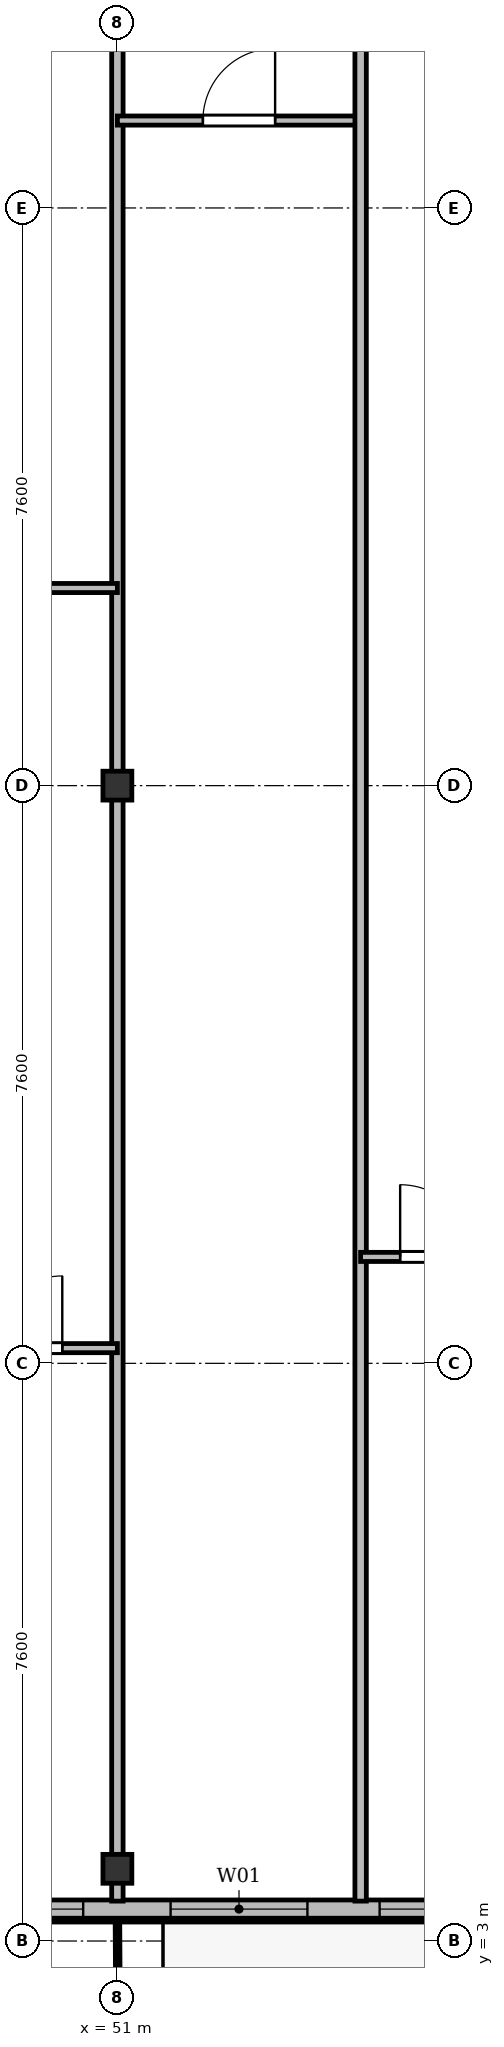
"""IFC4 building model, lengths in metres.
Left out: names, types, materials, properties, quantities, classifications, styles, units other than length and angle.
Written with IfcOpenShell. Run it as: python <this file> out.ifc"""

import sys

from ifc_helpers import new_model, si_unit, direction, frame, frame_2d, origin, origin_2d, place, context, subcontext, project, spatial, rectangle, i_section, extrude, source, transform, mapped, element, fill, save


model = new_model("IFC4")
c1 = context("Model", 3, precision=1e-05, world=origin(), true_north=direction((0.0, 1.0)))
c2 = subcontext(c1, "Body", "Model", "MODEL_VIEW")
j1 = project(units=[si_unit("LENGTHUNIT", "METRE"), si_unit("PLANEANGLEUNIT", "RADIAN")], contexts=[c1])
p1 = place(None, origin())
s1 = spatial("IfcSite", under=j1, at=p1, CompositionType="ELEMENT")
p2 = place(p1, origin())
s2 = spatial("IfcBuilding", under=s1, at=p2, CompositionType="ELEMENT")
p3 = place(p2, frame((0.0, 0.0, 139.3)))
s3 = spatial("IfcBuildingStorey", under=s2, at=p3, CompositionType="ELEMENT", Elevation=139.3)
m1 = source(origin(), c2, "Body", "SweptSolid", [
    extrude(i_section(OverallWidth=0.38, OverallDepth=0.38, WebThickness=0.02, FlangeThickness=0.03, at=origin_2d()), origin(), (0.0, 0.0, 1.0), 3.6),
])
for number, where, z_axis, x_axis in (
    (1, (51.0, 3.95, 0.0), (0.0, 0.0, 1.0), (1.0, 0.0, 0.0)),
    (2, (51.0, 18.2, 0.0), (0.0, 0.0, 1.0), (1.0, 0.0, 0.0)),
):
    element("IfcColumn", number, at=place(p3, frame(where, z_axis=z_axis, x_axis=x_axis)), inside=s3, PredefinedType="COLUMN", context=c2, shape_type="MappedRepresentation", body=[
        mapped(m1, transform((0.0, 0.0, 0.0), x_axis=(1.0, 0.0, 0.0), y_axis=(0.0, 1.0, 0.0), z_axis=(0.0, 0.0, 1.0), scale=1.0)),
    ])
p4 = place(p3, frame((63.6, 3.42, 0.0), z_axis=(0.0, 0.0, 1.0), x_axis=(-1.0, 0.0, 0.0)))
e3 = element("IfcWall", 3, at=p4, inside=s3, PredefinedType="SOLIDWALL", context=c2, shape_type="SweptSolid", body=[
    extrude(rectangle(XDim=52.8, YDim=0.24, at=frame_2d((26.4, 0.0))), origin(), (0.0, 0.0, 1.0), 3.35),
])
p5 = place(p4, frame((0.495, 0.0, 0.9)))
e4 = element("IfcOpeningElement", 4, at=p5, cuts=e3, PredefinedType="OPENING", context=c2, shape_type="SweptSolid", body=[
    extrude(rectangle(XDim=1.5, YDim=1.75, at=frame_2d((0.75, 0.875))), frame((0.0, 0.13, 0.0), z_axis=(0.0, -1.0, 0.0), x_axis=(1.0, 0.0, 0.0)), (0.0, 0.0, 1.0), 0.26),
])
p6 = place(p4, frame((2.9, 0.0, 0.9)))
e5 = element("IfcOpeningElement", 5, at=p6, cuts=e3, PredefinedType="OPENING", context=c2, shape_type="SweptSolid", body=[
    extrude(rectangle(XDim=1.5, YDim=1.75, at=frame_2d((0.75, 0.875))), frame((0.0, 0.13, 0.0), z_axis=(0.0, -1.0, 0.0), x_axis=(1.0, 0.0, 0.0)), (0.0, 0.0, 1.0), 0.26),
])
p7 = place(p4, frame((5.902, 0.0, 0.0)))
e6 = element("IfcOpeningElement", 6, at=p7, cuts=e3, PredefinedType="OPENING", context=c2, shape_type="SweptSolid", body=[
    extrude(rectangle(XDim=1.2, YDim=2.2, at=frame_2d((0.6, 1.1))), frame((0.0, 0.13, 0.0), z_axis=(0.0, -1.0, 0.0), x_axis=(1.0, 0.0, 0.0)), (0.0, 0.0, 1.0), 0.26),
])
p8 = place(p4, frame((7.65, 0.0, 0.9)))
e7 = element("IfcOpeningElement", 7, at=p8, cuts=e3, PredefinedType="OPENING", context=c2, shape_type="SweptSolid", body=[
    extrude(rectangle(XDim=1.5, YDim=1.75, at=frame_2d((0.75, 0.875))), frame((0.0, 0.13, 0.0), z_axis=(0.0, -1.0, 0.0), x_axis=(1.0, 0.0, 0.0)), (0.0, 0.0, 1.0), 0.26),
])
p9 = place(p4, frame((10.1, 0.0, 0.9)))
e8 = element("IfcOpeningElement", 8, at=p9, cuts=e3, PredefinedType="OPENING", context=c2, shape_type="SweptSolid", body=[
    extrude(rectangle(XDim=1.8, YDim=1.8, at=frame_2d((0.9, 0.9))), frame((0.0, 0.13, 0.0), z_axis=(0.0, -1.0, 0.0), x_axis=(1.0, 0.0, 0.0)), (0.0, 0.0, 1.0), 0.26),
])
p10 = place(p4, frame((13.05, 0.0, 0.9)))
e9 = element("IfcOpeningElement", 9, at=p10, cuts=e3, PredefinedType="OPENING", context=c2, shape_type="SweptSolid", body=[
    extrude(rectangle(XDim=1.5, YDim=1.75, at=frame_2d((0.75, 0.875))), frame((0.0, 0.13, 0.0), z_axis=(0.0, -1.0, 0.0), x_axis=(1.0, 0.0, 0.0)), (0.0, 0.0, 1.0), 0.26),
])
p11 = place(p4, frame((15.45, 0.0, 0.9)))
e10 = element("IfcOpeningElement", 10, at=p11, cuts=e3, PredefinedType="OPENING", context=c2, shape_type="SweptSolid", body=[
    extrude(rectangle(XDim=1.5, YDim=1.75, at=frame_2d((0.75, 0.875))), frame((0.0, 0.13, 0.0), z_axis=(0.0, -1.0, 0.0), x_axis=(1.0, 0.0, 0.0)), (0.0, 0.0, 1.0), 0.26),
])
p12 = place(p4, frame((17.6, 0.0, 0.9)))
e11 = element("IfcOpeningElement", 11, at=p12, cuts=e3, PredefinedType="OPENING", context=c2, shape_type="SweptSolid", body=[
    extrude(rectangle(XDim=2.0, YDim=1.95, at=frame_2d((1.0, 0.975))), frame((0.0, 0.13, 0.0), z_axis=(0.0, -1.0, 0.0), x_axis=(1.0, 0.0, 0.0)), (0.0, 0.0, 1.0), 0.26),
])
p13 = place(p4, frame((20.625, 0.0, 0.9)))
e12 = element("IfcOpeningElement", 12, at=p13, cuts=e3, PredefinedType="OPENING", context=c2, shape_type="SweptSolid", body=[
    extrude(rectangle(XDim=1.65, YDim=1.85, at=frame_2d((0.825, 0.925))), frame((0.0, 0.13, 0.0), z_axis=(0.0, -1.0, 0.0), x_axis=(1.0, 0.0, 0.0)), (0.0, 0.0, 1.0), 0.26),
])
p14 = place(p4, frame((23.85, 0.0, 0.9)))
e13 = element("IfcOpeningElement", 13, at=p14, cuts=e3, PredefinedType="OPENING", context=c2, shape_type="SweptSolid", body=[
    extrude(rectangle(XDim=1.8, YDim=1.8, at=frame_2d((0.9, 0.9))), frame((0.0, 0.13, 0.0), z_axis=(0.0, -1.0, 0.0), x_axis=(1.0, 0.0, 0.0)), (0.0, 0.0, 1.0), 0.26),
])
p15 = place(p4, frame((28.6, 0.0, 0.9)))
e14 = element("IfcOpeningElement", 14, at=p15, cuts=e3, PredefinedType="OPENING", context=c2, shape_type="SweptSolid", body=[
    extrude(rectangle(XDim=2.2, YDim=1.8, at=frame_2d((1.1, 0.9))), frame((0.0, 0.13, 0.0), z_axis=(0.0, -1.0, 0.0), x_axis=(1.0, 0.0, 0.0)), (0.0, 0.0, 1.0), 0.26),
])
p16 = place(p4, frame((34.478, 0.0, 0.0)))
e15 = element("IfcOpeningElement", 15, at=p16, cuts=e3, PredefinedType="OPENING", context=c2, shape_type="SweptSolid", body=[
    extrude(rectangle(XDim=1.2, YDim=2.2, at=frame_2d((0.6, 1.1))), frame((0.0, 0.13, 0.0), z_axis=(0.0, -1.0, 0.0), x_axis=(1.0, 0.0, 0.0)), (0.0, 0.0, 1.0), 0.26),
])
p17 = place(p4, frame((37.4, 0.0, 0.9)))
e16 = element("IfcOpeningElement", 16, at=p17, cuts=e3, PredefinedType="OPENING", context=c2, shape_type="SweptSolid", body=[
    extrude(rectangle(XDim=2.0, YDim=1.95, at=frame_2d((1.0, 0.975))), frame((0.0, 0.13, 0.0), z_axis=(0.0, -1.0, 0.0), x_axis=(1.0, 0.0, 0.0)), (0.0, 0.0, 1.0), 0.26),
])
p18 = place(p4, frame((40.975, 0.0, 0.9)))
e17 = element("IfcOpeningElement", 17, at=p18, cuts=e3, PredefinedType="OPENING", context=c2, shape_type="SweptSolid", body=[
    extrude(rectangle(XDim=1.65, YDim=1.85, at=frame_2d((0.825, 0.925))), frame((0.0, 0.13, 0.0), z_axis=(0.0, -1.0, 0.0), x_axis=(1.0, 0.0, 0.0)), (0.0, 0.0, 1.0), 0.26),
])
p19 = place(p4, frame((43.65, 0.0, 0.9)))
e18 = element("IfcOpeningElement", 18, at=p19, cuts=e3, PredefinedType="OPENING", context=c2, shape_type="SweptSolid", body=[
    extrude(rectangle(XDim=1.5, YDim=1.75, at=frame_2d((0.75, 0.875))), frame((0.0, 0.13, 0.0), z_axis=(0.0, -1.0, 0.0), x_axis=(1.0, 0.0, 0.0)), (0.0, 0.0, 1.0), 0.26),
])
p20 = place(p4, frame((45.85, 0.0, 0.9)))
e19 = element("IfcOpeningElement", 19, at=p20, cuts=e3, PredefinedType="OPENING", context=c2, shape_type="SweptSolid", body=[
    extrude(rectangle(XDim=1.5, YDim=1.75, at=frame_2d((0.75, 0.875))), frame((0.0, 0.13, 0.0), z_axis=(0.0, -1.0, 0.0), x_axis=(1.0, 0.0, 0.0)), (0.0, 0.0, 1.0), 0.26),
])
p21 = place(p4, frame((48.25, 0.0, 0.9)))
e20 = element("IfcOpeningElement", 20, at=p21, cuts=e3, PredefinedType="OPENING", context=c2, shape_type="SweptSolid", body=[
    extrude(rectangle(XDim=1.5, YDim=1.75, at=frame_2d((0.75, 0.875))), frame((0.0, 0.13, 0.0), z_axis=(0.0, -1.0, 0.0), x_axis=(1.0, 0.0, 0.0)), (0.0, 0.0, 1.0), 0.26),
])
p22 = place(p4, frame((50.455, 0.0, 0.9)))
e21 = element("IfcOpeningElement", 21, at=p22, cuts=e3, PredefinedType="OPENING", context=c2, shape_type="SweptSolid", body=[
    extrude(rectangle(XDim=2.0, YDim=1.95, at=frame_2d((1.0, 0.975))), frame((0.0, 0.13, 0.0), z_axis=(0.0, -1.0, 0.0), x_axis=(1.0, 0.0, 0.0)), (0.0, 0.0, 1.0), 0.26),
])
p23 = place(p3, frame((51.0, 3.525, 0.0), z_axis=(0.0, 0.0, 1.0), x_axis=(0.0, 1.0, 0.0)))
e22 = element("IfcWall", 22, at=p23, inside=s3, PredefinedType="PARTITIONING", context=c2, shape_type="SweptSolid", body=[
    extrude(rectangle(XDim=27.275, YDim=0.15, at=frame_2d((13.638, 0.0))), origin(), (0.0, 0.0, 1.0), 2.85),
])
p24 = place(p3, frame((43.8, 20.8, 0.0), z_axis=(0.0, 0.0, 1.0), x_axis=(1.0, 0.0, 0.0)))
e23 = element("IfcWall", 23, at=p24, inside=s3, PredefinedType="PARTITIONING", context=c2, shape_type="SweptSolid", body=[
    extrude(rectangle(XDim=7.2, YDim=0.12, at=frame_2d((3.6, 0.0))), origin(), (0.0, 0.0, 1.0), 2.85),
])
p25 = place(p24, frame((3.125, 0.0, 0.0)))
e24 = element("IfcOpeningElement", 24, at=p25, cuts=e23, PredefinedType="OPENING", context=c2, shape_type="SweptSolid", body=[
    extrude(rectangle(XDim=0.95, YDim=2.15, at=frame_2d((0.475, 1.075))), frame((0.0, 0.07, 0.0), z_axis=(0.0, -1.0, 0.0), x_axis=(1.0, 0.0, 0.0)), (0.0, 0.0, 1.0), 0.14),
])
p26 = place(p3, frame((48.6, 10.8, 0.0), z_axis=(0.0, 0.0, 1.0), x_axis=(1.0, 0.0, 0.0)))
e25 = element("IfcWall", 25, at=p26, inside=s3, PredefinedType="PARTITIONING", context=c2, shape_type="SweptSolid", body=[
    extrude(rectangle(XDim=2.4, YDim=0.12, at=frame_2d((1.2, 0.0))), origin(), (0.0, 0.0, 1.0), 2.85),
])
p27 = place(p26, frame((0.725, 0.0, 0.0)))
e26 = element("IfcOpeningElement", 26, at=p27, cuts=e25, PredefinedType="OPENING", context=c2, shape_type="SweptSolid", body=[
    extrude(rectangle(XDim=0.95, YDim=2.15, at=frame_2d((0.475, 1.075))), frame((0.0, 0.07, 0.0), z_axis=(0.0, -1.0, 0.0), x_axis=(1.0, 0.0, 0.0)), (0.0, 0.0, 1.0), 0.14),
])
p28 = place(p3, frame((51.0, 26.95, 0.0), z_axis=(0.0, 0.0, 1.0), x_axis=(1.0, 0.0, 0.0)))
e27 = element("IfcWall", 27, at=p28, inside=s3, PredefinedType="PARTITIONING", context=c2, shape_type="SweptSolid", body=[
    extrude(rectangle(XDim=3.2, YDim=0.12, at=frame_2d((1.6, 0.0))), origin(), (0.0, 0.0, 1.0), 2.85),
])
p29 = place(p28, frame((1.125, 0.0, 0.0)))
e28 = element("IfcOpeningElement", 28, at=p29, cuts=e27, PredefinedType="OPENING", context=c2, shape_type="SweptSolid", body=[
    extrude(rectangle(XDim=0.95, YDim=2.15, at=frame_2d((0.475, 1.075))), frame((0.0, 0.07, 0.0), z_axis=(0.0, -1.0, 0.0), x_axis=(1.0, 0.0, 0.0)), (0.0, 0.0, 1.0), 0.14),
])
p30 = place(p3, frame((54.2, 3.525, 0.0), z_axis=(0.0, 0.0, 1.0), x_axis=(0.0, 1.0, 0.0)))
e29 = element("IfcWall", 29, at=p30, inside=s3, PredefinedType="PARTITIONING", context=c2, shape_type="SweptSolid", body=[
    extrude(rectangle(XDim=27.275, YDim=0.15, at=frame_2d((13.638, 0.0))), origin(), (0.0, 0.0, 1.0), 2.75),
])
p31 = place(p3, frame((54.2, 12.0, 0.0), z_axis=(0.0, 0.0, 1.0), x_axis=(1.0, 0.0, 0.0)))
e30 = element("IfcWall", 30, at=p31, inside=s3, PredefinedType="PARTITIONING", context=c2, shape_type="SweptSolid", body=[
    extrude(rectangle(XDim=2.0, YDim=0.12, at=frame_2d((1.0, 0.0))), origin(), (0.0, 0.0, 1.0), 3.35),
])
p32 = place(p31, frame((0.52, 0.0, 0.0)))
e31 = element("IfcOpeningElement", 31, at=p32, cuts=e30, PredefinedType="OPENING", context=c2, shape_type="SweptSolid", body=[
    extrude(rectangle(XDim=0.95, YDim=2.15, at=frame_2d((0.475, 1.075))), frame((0.0, 0.07, 0.0), z_axis=(0.0, -1.0, 0.0), x_axis=(1.0, 0.0, 0.0)), (0.0, 0.0, 1.0), 0.14),
])
m2 = source(origin(), c2, "Body", "SweptSolid", [
    extrude(rectangle(XDim=1.5, YDim=1.75, at=frame_2d((0.75, 0.875))), frame((0.0, 0.03, 0.0), z_axis=(0.0, -1.0, 0.0), x_axis=(1.0, 0.0, 0.0)), (0.0, 0.0, 1.0), 0.06),
])
p33 = place(p8, origin())
e32 = element("IfcWindow", 32, at=p33, inside=s3, PartitioningType="SINGLE_PANEL", PredefinedType="WINDOW", context=c2, shape_type="MappedRepresentation", body=[
    mapped(m2, transform((0.0, 0.0, 0.0), x_axis=(1.0, 0.0, 0.0), y_axis=(0.0, 1.0, 0.0), z_axis=(0.0, 0.0, 1.0), scale=1.0)),
])
fill(e7, e32)
m3 = source(origin(), c2, "Body", "SweptSolid", [
    extrude(rectangle(XDim=1.8, YDim=1.8, at=frame_2d((0.9, 0.9))), frame((0.0, 0.03, 0.0), z_axis=(0.0, -1.0, 0.0), x_axis=(1.0, 0.0, 0.0)), (0.0, 0.0, 1.0), 0.06),
])
p34 = place(p9, origin())
e33 = element("IfcWindow", 33, at=p34, inside=s3, PartitioningType="SINGLE_PANEL", PredefinedType="WINDOW", context=c2, shape_type="MappedRepresentation", body=[
    mapped(m3, transform((0.0, 0.0, 0.0), x_axis=(1.0, 0.0, 0.0), y_axis=(0.0, 1.0, 0.0), z_axis=(0.0, 0.0, 1.0), scale=1.0)),
])
fill(e8, e33)
p35 = place(p10, origin())
e34 = element("IfcWindow", 34, at=p35, inside=s3, PartitioningType="SINGLE_PANEL", PredefinedType="WINDOW", context=c2, shape_type="MappedRepresentation", body=[
    mapped(m2, transform((0.0, 0.0, 0.0), x_axis=(1.0, 0.0, 0.0), y_axis=(0.0, 1.0, 0.0), z_axis=(0.0, 0.0, 1.0), scale=1.0)),
])
fill(e9, e34)
m4 = source(origin(), c2, "Body", "SweptSolid", [
    extrude(rectangle(XDim=0.95, YDim=2.15, at=frame_2d((0.475, 1.075))), frame((0.0, 0.025, 0.0), z_axis=(0.0, -1.0, 0.0), x_axis=(1.0, 0.0, 0.0)), (0.0, 0.0, 1.0), 0.05),
])
p36 = place(p27, origin())
e35 = element("IfcDoor", 35, at=p36, inside=s3, OperationType="SINGLE_SWING_RIGHT", PredefinedType="DOOR", context=c2, shape_type="MappedRepresentation", body=[
    mapped(m4, transform((0.0, 0.0, 0.0), x_axis=(1.0, 0.0, 0.0), y_axis=(0.0, 1.0, 0.0), z_axis=(0.0, 0.0, 1.0), scale=1.0)),
])
fill(e26, e35)
p37 = place(p29, origin())
e36 = element("IfcDoor", 36, at=p37, inside=s3, OperationType="SINGLE_SWING_RIGHT", PredefinedType="DOOR", context=c2, shape_type="MappedRepresentation", body=[
    mapped(m4, transform((0.0, 0.0, 0.0), x_axis=(1.0, 0.0, 0.0), y_axis=(0.0, 1.0, 0.0), z_axis=(0.0, 0.0, 1.0), scale=1.0)),
])
fill(e28, e36)
p38 = place(p32, origin())
e37 = element("IfcDoor", 37, at=p38, inside=s3, OperationType="SINGLE_SWING_LEFT", PredefinedType="DOOR", context=c2, shape_type="MappedRepresentation", body=[
    mapped(m4, transform((0.0, 0.0, 0.0), x_axis=(1.0, 0.0, 0.0), y_axis=(0.0, 1.0, 0.0), z_axis=(0.0, 0.0, 1.0), scale=1.0)),
])
fill(e31, e37)
save(model, sys.argv[1])
